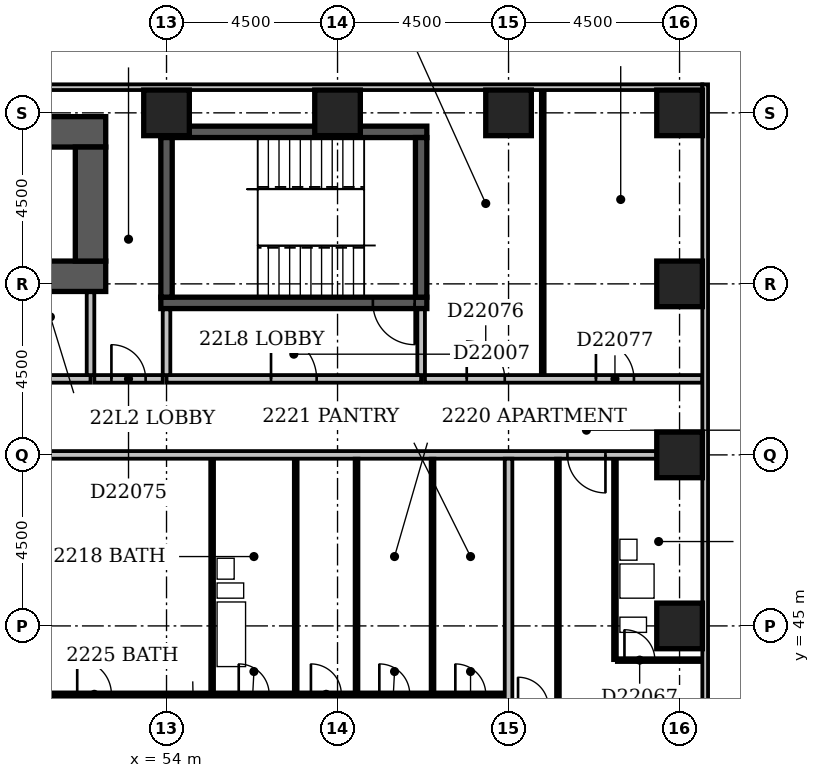
"""IFC4 building model, lengths in metres.
Left out: names, types, materials, properties, quantities, classifications, styles, units other than length and angle.
Written with IfcOpenShell. Run it as: python <this file> out.ifc"""

import sys

from ifc_helpers import new_model, si_unit, direction, frame, frame_2d, origin, origin_2d, place, context, subcontext, project, spatial, rectangle, extrude, element, fill, save


model = new_model("IFC4")
c1 = context("Model", 3, precision=1e-05, world=origin(), true_north=direction((0.0, 1.0)))
c2 = subcontext(c1, "Body", "Model", "MODEL_VIEW")
j1 = project(units=[si_unit("LENGTHUNIT", "METRE"), si_unit("PLANEANGLEUNIT", "RADIAN")], contexts=[c1])
p1 = place(None, origin())
s1 = spatial("IfcSite", under=j1, at=p1, CompositionType="ELEMENT")
p2 = place(p1, origin())
s2 = spatial("IfcBuilding", under=s1, at=p2, CompositionType="ELEMENT")
p3 = place(p2, frame((0.0, 0.0, 90.2)))
s3 = spatial("IfcBuildingStorey", under=s2, at=p3, CompositionType="ELEMENT", Elevation=90.2)
for number, where, z_axis, x_axis in (
    (1, (47.0, 54.2, -0.3), (0.0, 0.0, 1.0), (1.0, 0.0, 0.0)),
    (2, (47.0, 58.0, -0.3), (0.0, 0.0, 1.0), (1.0, 0.0, 0.0)),
):
    element("IfcWall", number, at=place(p3, frame(where, z_axis=z_axis, x_axis=x_axis)), inside=s3, PredefinedType="SHEAR", context=c2, shape_type="SweptSolid", body=[
        extrude(rectangle(XDim=5.4, YDim=0.8, at=frame_2d((2.7, 0.0))), origin(), (0.0, 0.0, 1.0), 3.6),
    ])
p4 = place(p3, frame((52.0, 54.6, -0.3), z_axis=(0.0, 0.0, 1.0), x_axis=(0.0, 1.0, 0.0)))
e3 = element("IfcWall", 3, at=p4, inside=s3, PredefinedType="SHEAR", context=c2, shape_type="SweptSolid", body=[
    extrude(rectangle(XDim=3.0, YDim=0.8, at=frame_2d((1.5, 0.0))), origin(), (0.0, 0.0, 1.0), 3.6),
])
p5 = place(p3, frame((53.85, 53.5, -0.3), z_axis=(0.0, 0.0, 1.0), x_axis=(1.0, 0.0, 0.0)))
e4 = element("IfcWall", 4, at=p5, inside=s3, PredefinedType="SHEAR", context=c2, shape_type="SweptSolid", body=[
    extrude(rectangle(XDim=7.0, YDim=0.3, at=frame_2d((3.5, 0.0))), origin(), (0.0, 0.0, 1.0), 3.6),
])
p6 = place(p5, frame((5.58, 0.0, 0.3)))
e5 = element("IfcOpeningElement", 5, at=p6, cuts=e4, PredefinedType="OPENING", context=c2, shape_type="SweptSolid", body=[
    extrude(rectangle(XDim=1.1, YDim=2.1, at=frame_2d((0.55, 1.05))), frame((0.0, 0.162, 0.0), z_axis=(0.0, -1.0, 0.0), x_axis=(1.0, 0.0, 0.0)), (0.0, 0.0, 1.0), 0.324),
])
p7 = place(p3, frame((53.85, 58.0, -0.3), z_axis=(0.0, 0.0, 1.0), x_axis=(1.0, 0.0, 0.0)))
e6 = element("IfcWall", 6, at=p7, inside=s3, PredefinedType="SHEAR", context=c2, shape_type="SweptSolid", body=[
    extrude(rectangle(XDim=7.0, YDim=0.3, at=frame_2d((3.5, 0.0))), origin(), (0.0, 0.0, 1.0), 3.6),
])
for number, where, z_axis, x_axis in (
    (7, (54.0, 53.65, -0.3), (0.0, 0.0, 1.0), (0.0, 1.0, 0.0)),
    (8, (60.7, 53.65, -0.3), (0.0, 0.0, 1.0), (0.0, 1.0, 0.0)),
):
    element("IfcWall", number, at=place(p3, frame(where, z_axis=z_axis, x_axis=x_axis)), inside=s3, PredefinedType="SHEAR", context=c2, shape_type="SweptSolid", body=[
        extrude(rectangle(XDim=4.2, YDim=0.3, at=frame_2d((2.1, 0.0))), origin(), (0.0, 0.0, 1.0), 3.6),
    ])
for number, where, z_axis, x_axis in (
    (9, (67.5, 45.0, -0.3), (0.0, 0.0, 1.0), (1.0, 0.0, 0.0)),
    (10, (67.5, 49.5, -0.3), (0.0, 0.0, 1.0), (1.0, 0.0, 0.0)),
    (11, (67.5, 54.0, -0.3), (0.0, 0.0, 1.0), (1.0, 0.0, 0.0)),
    (12, (54.0, 58.5, -0.3), (0.0, 0.0, 1.0), (1.0, 0.0, 0.0)),
    (13, (58.5, 58.5, -0.3), (0.0, 0.0, 1.0), (1.0, 0.0, 0.0)),
    (14, (63.0, 58.5, -0.3), (0.0, 0.0, 1.0), (1.0, 0.0, 0.0)),
    (15, (67.5, 58.5, -0.3), (0.0, 0.0, 1.0), (1.0, 0.0, 0.0)),
):
    element("IfcColumn", number, at=place(p3, frame(where, z_axis=z_axis, x_axis=x_axis)), inside=s3, PredefinedType="COLUMN", context=c2, shape_type="SweptSolid", body=[
        extrude(rectangle(XDim=1.2, YDim=1.2, at=origin_2d()), origin(), (0.0, 0.0, 1.0), 3.6),
    ])
p8 = place(p3, frame((68.175, 35.4, 0.0), z_axis=(0.0, 0.0, 1.0), x_axis=(0.0, 1.0, 0.0)))
e16 = element("IfcWall", 16, at=p8, inside=s3, PredefinedType="STANDARD", context=c2, shape_type="SweptSolid", body=[
    extrude(rectangle(XDim=23.85, YDim=0.15, at=frame_2d((11.925, 0.0))), origin(), (0.0, 0.0, 1.0), 2.7),
])
p9 = place(p8, frame((2.49, 0.0, 0.6)))
e17 = element("IfcOpeningElement", 17, at=p9, cuts=e16, PredefinedType="OPENING", context=c2, shape_type="SweptSolid", body=[
    extrude(rectangle(XDim=1.8, YDim=1.8, at=frame_2d((0.9, 0.9))), frame((0.0, 0.087, 0.0), z_axis=(0.0, -1.0, 0.0), x_axis=(1.0, 0.0, 0.0)), (0.0, 0.0, 1.0), 0.174),
])
p10 = place(p3, frame((68.1, 59.175, 0.0), z_axis=(0.0, 0.0, 1.0), x_axis=(-1.0, 0.0, 0.0)))
e18 = element("IfcWall", 18, at=p10, inside=s3, PredefinedType="STANDARD", context=c2, shape_type="SweptSolid", body=[
    extrude(rectangle(XDim=68.85, YDim=0.15, at=frame_2d((34.425, 0.0))), origin(), (0.0, 0.0, 1.0), 2.7),
])
p11 = place(p10, frame((37.65, 0.0, 0.6)))
e19 = element("IfcOpeningElement", 19, at=p11, cuts=e18, PredefinedType="OPENING", context=c2, shape_type="SweptSolid", body=[
    extrude(rectangle(XDim=2.4, YDim=1.8, at=frame_2d((1.2, 0.9))), frame((0.0, 0.087, 0.0), z_axis=(0.0, -1.0, 0.0), x_axis=(1.0, 0.0, 0.0)), (0.0, 0.0, 1.0), 0.174),
])
p12 = place(p3, frame((47.0, 51.5, 0.0), z_axis=(0.0, 0.0, 1.0), x_axis=(1.0, 0.0, 0.0)))
e20 = element("IfcWall", 20, at=p12, inside=s3, PredefinedType="PARTITIONING", context=c2, shape_type="SweptSolid", body=[
    extrude(rectangle(XDim=5.0, YDim=0.2, at=frame_2d((2.5, 0.0))), origin(), (0.0, 0.0, 1.0), 3.3),
])
p13 = place(p12, frame((1.9, 0.0, 0.0)))
e21 = element("IfcOpeningElement", 21, at=p13, cuts=e20, PredefinedType="OPENING", context=c2, shape_type="SweptSolid", body=[
    extrude(rectangle(XDim=1.2, YDim=2.1, at=frame_2d((0.6, 1.05))), frame((0.0, 0.112, 0.0), z_axis=(0.0, -1.0, 0.0), x_axis=(1.0, 0.0, 0.0)), (0.0, 0.0, 1.0), 0.224),
])
p14 = place(p3, frame((52.0, 51.6, 0.0), z_axis=(0.0, 0.0, 1.0), x_axis=(0.0, 1.0, 0.0)))
e22 = element("IfcWall", 22, at=p14, inside=s3, PredefinedType="PARTITIONING", context=c2, shape_type="SweptSolid", body=[
    extrude(rectangle(XDim=2.18, YDim=0.2, at=frame_2d((1.09, 0.0))), origin(), (0.0, 0.0, 1.0), 3.3),
])
p15 = place(p3, frame((54.0, 51.5, 0.0), z_axis=(0.0, 0.0, 1.0), x_axis=(1.0, 0.0, 0.0)))
e23 = element("IfcWall", 23, at=p15, inside=s3, PredefinedType="PARTITIONING", context=c2, shape_type="SweptSolid", body=[
    extrude(rectangle(XDim=6.7, YDim=0.2, at=frame_2d((3.35, 0.0))), origin(), (0.0, 0.0, 1.0), 3.3),
])
p16 = place(p15, frame((2.75, 0.0, 0.0)))
e24 = element("IfcOpeningElement", 24, at=p16, cuts=e23, PredefinedType="OPENING", context=c2, shape_type="SweptSolid", body=[
    extrude(rectangle(XDim=1.2, YDim=2.1, at=frame_2d((0.6, 1.05))), frame((0.0, 0.112, 0.0), z_axis=(0.0, -1.0, 0.0), x_axis=(1.0, 0.0, 0.0)), (0.0, 0.0, 1.0), 0.224),
])
p17 = place(p3, frame((60.7, 51.6, 0.0), z_axis=(0.0, 0.0, 1.0), x_axis=(0.0, 1.0, 0.0)))
e25 = element("IfcWall", 25, at=p17, inside=s3, PredefinedType="PARTITIONING", context=c2, shape_type="SweptSolid", body=[
    extrude(rectangle(XDim=1.73, YDim=0.2, at=frame_2d((0.865, 0.0))), origin(), (0.0, 0.0, 1.0), 3.3),
])
p18 = place(p3, frame((54.0, 51.6, 0.0), z_axis=(0.0, 0.0, 1.0), x_axis=(0.0, 1.0, 0.0)))
e26 = element("IfcWall", 26, at=p18, inside=s3, PredefinedType="PARTITIONING", context=c2, shape_type="SweptSolid", body=[
    extrude(rectangle(XDim=1.73, YDim=0.2, at=frame_2d((0.865, 0.0))), origin(), (0.0, 0.0, 1.0), 2.6),
])
p19 = place(p3, frame((63.0, 36.6, 0.0), z_axis=(0.0, 0.0, 1.0), x_axis=(0.0, 1.0, 0.0)))
e27 = element("IfcWall", 27, at=p19, inside=s3, PredefinedType="PARTITIONING", context=c2, shape_type="SweptSolid", body=[
    extrude(rectangle(XDim=12.8, YDim=0.2, at=frame_2d((6.4, 0.0))), origin(), (0.0, 0.0, 1.0), 2.4),
])
p20 = place(p3, frame((64.3, 42.85, 0.0), z_axis=(0.0, 0.0, 1.0), x_axis=(0.0, 1.0, 0.0)))
e28 = element("IfcWall", 28, at=p20, inside=s3, PredefinedType="PARTITIONING", context=c2, shape_type="SweptSolid", body=[
    extrude(rectangle(XDim=6.55, YDim=0.1, at=frame_2d((3.275, 0.0))), origin(), (0.0, 0.0, 1.0), 3.3),
])
p21 = place(p3, frame((49.05, 43.2, 0.0), z_axis=(0.0, 0.0, 1.0), x_axis=(1.0, 0.0, 0.0)))
e29 = element("IfcWall", 29, at=p21, inside=s3, PredefinedType="PARTITIONING", context=c2, shape_type="SweptSolid", body=[
    extrude(rectangle(XDim=13.85, YDim=0.1, at=frame_2d((6.925, 0.0))), origin(), (0.0, 0.0, 1.0), 3.3),
])
p22 = place(p21, frame((6.85, 0.0, 0.0)))
e30 = element("IfcOpeningElement", 30, at=p22, cuts=e29, PredefinedType="OPENING", context=c2, shape_type="SweptSolid", body=[
    extrude(rectangle(XDim=0.8, YDim=2.1, at=frame_2d((0.4, 1.05))), frame((0.0, 0.062, 0.0), z_axis=(0.0, -1.0, 0.0), x_axis=(1.0, 0.0, 0.0)), (0.0, 0.0, 1.0), 0.124),
])
p23 = place(p21, frame((2.6, 0.0, 0.0)))
e31 = element("IfcOpeningElement", 31, at=p23, cuts=e29, PredefinedType="OPENING", context=c2, shape_type="SweptSolid", body=[
    extrude(rectangle(XDim=0.9, YDim=2.1, at=frame_2d((0.45, 1.05))), frame((0.0, 0.062, 0.0), z_axis=(0.0, -1.0, 0.0), x_axis=(1.0, 0.0, 0.0)), (0.0, 0.0, 1.0), 0.124),
])
p24 = place(p21, frame((12.55, 0.0, 0.0)))
e32 = element("IfcOpeningElement", 32, at=p24, cuts=e29, PredefinedType="OPENING", context=c2, shape_type="SweptSolid", body=[
    extrude(rectangle(XDim=0.8, YDim=2.1, at=frame_2d((0.4, 1.05))), frame((0.0, 0.062, 0.0), z_axis=(0.0, -1.0, 0.0), x_axis=(1.0, 0.0, 0.0)), (0.0, 0.0, 1.0), 0.124),
])
p25 = place(p21, frame((8.75, 0.0, 0.0)))
e33 = element("IfcOpeningElement", 33, at=p25, cuts=e29, PredefinedType="OPENING", context=c2, shape_type="SweptSolid", body=[
    extrude(rectangle(XDim=0.8, YDim=2.1, at=frame_2d((0.4, 1.05))), frame((0.0, 0.062, 0.0), z_axis=(0.0, -1.0, 0.0), x_axis=(1.0, 0.0, 0.0)), (0.0, 0.0, 1.0), 0.124),
])
p26 = place(p21, frame((10.55, 0.0, 0.0)))
e34 = element("IfcOpeningElement", 34, at=p26, cuts=e29, PredefinedType="OPENING", context=c2, shape_type="SweptSolid", body=[
    extrude(rectangle(XDim=0.8, YDim=2.1, at=frame_2d((0.4, 1.05))), frame((0.0, 0.062, 0.0), z_axis=(0.0, -1.0, 0.0), x_axis=(1.0, 0.0, 0.0)), (0.0, 0.0, 1.0), 0.124),
])
for number, where, z_axis, x_axis in (
    (35, (55.2, 43.25, 0.0), (0.0, 0.0, 1.0), (0.0, 1.0, 0.0)),
    (36, (57.4, 43.25, 0.0), (0.0, 0.0, 1.0), (0.0, 1.0, 0.0)),
):
    element("IfcWall", number, at=place(p3, frame(where, z_axis=z_axis, x_axis=x_axis)), inside=s3, PredefinedType="PLUMBINGWALL", context=c2, shape_type="SweptSolid", body=[
        extrude(rectangle(XDim=6.15, YDim=0.1, at=frame_2d((3.075, 0.0))), origin(), (0.0, 0.0, 1.0), 3.3),
    ])
for number, where, z_axis, x_axis in (
    (37, (59.0, 43.25, 0.0), (0.0, 0.0, 1.0), (0.0, 1.0, 0.0)),
    (38, (61.0, 43.25, 0.0), (0.0, 0.0, 1.0), (0.0, 1.0, 0.0)),
):
    element("IfcWall", number, at=place(p3, frame(where, z_axis=z_axis, x_axis=x_axis)), inside=s3, PredefinedType="PARTITIONING", context=c2, shape_type="SweptSolid", body=[
        extrude(rectangle(XDim=6.15, YDim=0.1, at=frame_2d((3.075, 0.0))), origin(), (0.0, 0.0, 1.0), 3.3),
    ])
p27 = place(p3, frame((65.8, 44.1, 0.0), z_axis=(0.0, 0.0, 1.0), x_axis=(0.0, 1.0, 0.0)))
e39 = element("IfcWall", 39, at=p27, inside=s3, PredefinedType="PLUMBINGWALL", context=c2, shape_type="SweptSolid", body=[
    extrude(rectangle(XDim=5.3, YDim=0.1, at=frame_2d((2.65, 0.0))), origin(), (0.0, 0.0, 1.0), 3.3),
])
p28 = place(p3, frame((65.85, 44.1, 0.0), z_axis=(0.0, 0.0, 1.0), x_axis=(1.0, 0.0, 0.0)))
e40 = element("IfcWall", 40, at=p28, inside=s3, PredefinedType="PARTITIONING", context=c2, shape_type="SweptSolid", body=[
    extrude(rectangle(XDim=2.25, YDim=0.1, at=frame_2d((1.125, 0.0))), origin(), (0.0, 0.0, 1.0), 3.3),
])
p29 = place(p28, frame((0.2, 0.0, 0.0)))
e41 = element("IfcOpeningElement", 41, at=p29, cuts=e40, PredefinedType="OPENING", context=c2, shape_type="SweptSolid", body=[
    extrude(rectangle(XDim=0.8, YDim=2.1, at=frame_2d((0.4, 1.05))), frame((0.0, 0.062, 0.0), z_axis=(0.0, -1.0, 0.0), x_axis=(1.0, 0.0, 0.0)), (0.0, 0.0, 1.0), 0.124),
])
p30 = place(p3, frame((9.1, 49.5, 0.0), z_axis=(0.0, 0.0, 1.0), x_axis=(1.0, 0.0, 0.0)))
e42 = element("IfcWall", 42, at=p30, inside=s3, PredefinedType="PARTITIONING", context=c2, shape_type="SweptSolid", body=[
    extrude(rectangle(XDim=57.8, YDim=0.2, at=frame_2d((28.9, 0.0))), origin(), (0.0, 0.0, 1.0), 3.3),
])
p31 = place(p30, frame((13.7, 0.0, 0.0)))
e43 = element("IfcOpeningElement", 43, at=p31, cuts=e42, PredefinedType="OPENING", context=c2, shape_type="SweptSolid", body=[
    extrude(rectangle(XDim=1.0, YDim=2.1, at=frame_2d((0.5, 1.05))), frame((0.0, 0.112, 0.0), z_axis=(0.0, -1.0, 0.0), x_axis=(1.0, 0.0, 0.0)), (0.0, 0.0, 1.0), 0.224),
])
p32 = place(p30, frame((22.7, 0.0, 0.0)))
e44 = element("IfcOpeningElement", 44, at=p32, cuts=e42, PredefinedType="OPENING", context=c2, shape_type="SweptSolid", body=[
    extrude(rectangle(XDim=1.0, YDim=2.1, at=frame_2d((0.5, 1.05))), frame((0.0, 0.112, 0.0), z_axis=(0.0, -1.0, 0.0), x_axis=(1.0, 0.0, 0.0)), (0.0, 0.0, 1.0), 0.224),
])
p33 = place(p30, frame((38.6, 0.0, 0.0)))
e45 = element("IfcOpeningElement", 45, at=p33, cuts=e42, PredefinedType="OPENING", context=c2, shape_type="SweptSolid", body=[
    extrude(rectangle(XDim=1.0, YDim=2.1, at=frame_2d((0.5, 1.05))), frame((0.0, 0.112, 0.0), z_axis=(0.0, -1.0, 0.0), x_axis=(1.0, 0.0, 0.0)), (0.0, 0.0, 1.0), 0.224),
])
p34 = place(p30, frame((55.45, 0.0, 0.0)))
e46 = element("IfcOpeningElement", 46, at=p34, cuts=e42, PredefinedType="OPENING", context=c2, shape_type="SweptSolid", body=[
    extrude(rectangle(XDim=1.0, YDim=2.1, at=frame_2d((0.5, 1.05))), frame((0.0, 0.112, 0.0), z_axis=(0.0, -1.0, 0.0), x_axis=(1.0, 0.0, 0.0)), (0.0, 0.0, 1.0), 0.224),
])
p35 = place(p30, frame((6.15, 0.0, 0.0)))
e47 = element("IfcOpeningElement", 47, at=p35, cuts=e42, PredefinedType="OPENING", context=c2, shape_type="SweptSolid", body=[
    extrude(rectangle(XDim=0.9, YDim=2.1, at=frame_2d((0.45, 1.05))), frame((0.0, 0.112, 0.0), z_axis=(0.0, -1.0, 0.0), x_axis=(1.0, 0.0, 0.0)), (0.0, 0.0, 1.0), 0.224),
])
p36 = place(p3, frame((52.1, 51.5, 0.0), z_axis=(0.0, 0.0, 1.0), x_axis=(1.0, 0.0, 0.0)))
e48 = element("IfcWall", 48, at=p36, inside=s3, PredefinedType="PARTITIONING", context=c2, shape_type="SweptSolid", body=[
    extrude(rectangle(XDim=1.8, YDim=0.2, at=frame_2d((0.9, 0.0))), origin(), (0.0, 0.0, 1.0), 3.3),
])
p37 = place(p36, frame((0.45, 0.0, 0.0)))
e49 = element("IfcOpeningElement", 49, at=p37, cuts=e48, PredefinedType="OPENING", context=c2, shape_type="SweptSolid", body=[
    extrude(rectangle(XDim=0.9, YDim=2.1, at=frame_2d((0.45, 1.05))), frame((0.0, 0.112, 0.0), z_axis=(0.0, -1.0, 0.0), x_axis=(1.0, 0.0, 0.0)), (0.0, 0.0, 1.0), 0.224),
])
p38 = place(p3, frame((60.8, 51.5, 0.0), z_axis=(0.0, 0.0, 1.0), x_axis=(1.0, 0.0, 0.0)))
e50 = element("IfcWall", 50, at=p38, inside=s3, PredefinedType="PARTITIONING", context=c2, shape_type="SweptSolid", body=[
    extrude(rectangle(XDim=7.3, YDim=0.2, at=frame_2d((3.65, 0.0))), origin(), (0.0, 0.0, 1.0), 3.3),
])
p39 = place(p38, frame((1.1, 0.0, 0.0)))
e51 = element("IfcOpeningElement", 51, at=p39, cuts=e50, PredefinedType="OPENING", context=c2, shape_type="SweptSolid", body=[
    extrude(rectangle(XDim=1.0, YDim=2.1, at=frame_2d((0.5, 1.05))), frame((0.0, 0.112, 0.0), z_axis=(0.0, -1.0, 0.0), x_axis=(1.0, 0.0, 0.0)), (0.0, 0.0, 1.0), 0.224),
])
p40 = place(p38, frame((4.5, 0.0, 0.0)))
e52 = element("IfcOpeningElement", 52, at=p40, cuts=e50, PredefinedType="OPENING", context=c2, shape_type="SweptSolid", body=[
    extrude(rectangle(XDim=1.0, YDim=2.1, at=frame_2d((0.5, 1.05))), frame((0.0, 0.112, 0.0), z_axis=(0.0, -1.0, 0.0), x_axis=(1.0, 0.0, 0.0)), (0.0, 0.0, 1.0), 0.224),
])
p41 = place(p3, frame((63.9, 51.6, 0.0), z_axis=(0.0, 0.0, 1.0), x_axis=(0.0, 1.0, 0.0)))
e53 = element("IfcWall", 53, at=p41, inside=s3, PredefinedType="PARTITIONING", context=c2, shape_type="SweptSolid", body=[
    extrude(rectangle(XDim=7.5, YDim=0.1, at=frame_2d((3.75, 0.0))), origin(), (0.0, 0.0, 1.0), 3.3),
])
p42 = place(p16, origin())
e54 = element("IfcDoor", 54, at=p42, inside=s3, OperationType="SINGLE_SWING_LEFT", PredefinedType="DOOR", context=c2, shape_type="SweptSolid", body=[
    extrude(rectangle(XDim=1.2, YDim=2.1, at=frame_2d((0.6, 1.05))), frame((0.0, 0.025, 0.0), z_axis=(0.0, -1.0, 0.0), x_axis=(1.0, 0.0, 0.0)), (0.0, 0.0, 1.0), 0.05),
])
fill(e24, e54)
p43 = place(p6, origin())
e55 = element("IfcDoor", 55, at=p43, inside=s3, OperationType="SINGLE_SWING_RIGHT", PredefinedType="DOOR", context=c2, shape_type="SweptSolid", body=[
    extrude(rectangle(XDim=1.1, YDim=2.1, at=frame_2d((0.55, 1.05))), frame((0.0, 0.025, 0.0), z_axis=(0.0, -1.0, 0.0), x_axis=(1.0, 0.0, 0.0)), (0.0, 0.0, 1.0), 0.05),
])
fill(e5, e55)
p44 = place(p22, origin())
e56 = element("IfcDoor", 56, at=p44, inside=s3, OperationType="SINGLE_SWING_LEFT", PredefinedType="DOOR", context=c2, shape_type="SweptSolid", body=[
    extrude(rectangle(XDim=0.8, YDim=2.1, at=frame_2d((0.4, 1.05))), frame((0.0, 0.025, 0.0), z_axis=(0.0, -1.0, 0.0), x_axis=(1.0, 0.0, 0.0)), (0.0, 0.0, 1.0), 0.05),
])
fill(e30, e56)
p45 = place(p23, origin())
e57 = element("IfcDoor", 57, at=p45, inside=s3, OperationType="SINGLE_SWING_LEFT", PredefinedType="DOOR", context=c2, shape_type="SweptSolid", body=[
    extrude(rectangle(XDim=0.9, YDim=2.1, at=frame_2d((0.45, 1.05))), frame((0.0, 0.025, 0.0), z_axis=(0.0, -1.0, 0.0), x_axis=(1.0, 0.0, 0.0)), (0.0, 0.0, 1.0), 0.05),
])
fill(e31, e57)
p46 = place(p24, origin())
e58 = element("IfcDoor", 58, at=p46, inside=s3, OperationType="SINGLE_SWING_LEFT", PredefinedType="DOOR", context=c2, shape_type="SweptSolid", body=[
    extrude(rectangle(XDim=0.8, YDim=2.1, at=frame_2d((0.4, 1.05))), frame((0.0, 0.025, 0.0), z_axis=(0.0, -1.0, 0.0), x_axis=(1.0, 0.0, 0.0)), (0.0, 0.0, 1.0), 0.05),
])
fill(e32, e58)
p47 = place(p25, origin())
e59 = element("IfcDoor", 59, at=p47, inside=s3, OperationType="SINGLE_SWING_LEFT", PredefinedType="DOOR", context=c2, shape_type="SweptSolid", body=[
    extrude(rectangle(XDim=0.8, YDim=2.1, at=frame_2d((0.4, 1.05))), frame((0.0, 0.025, 0.0), z_axis=(0.0, -1.0, 0.0), x_axis=(1.0, 0.0, 0.0)), (0.0, 0.0, 1.0), 0.05),
])
fill(e33, e59)
p48 = place(p26, origin())
e60 = element("IfcDoor", 60, at=p48, inside=s3, OperationType="SINGLE_SWING_LEFT", PredefinedType="DOOR", context=c2, shape_type="SweptSolid", body=[
    extrude(rectangle(XDim=0.8, YDim=2.1, at=frame_2d((0.4, 1.05))), frame((0.0, 0.025, 0.0), z_axis=(0.0, -1.0, 0.0), x_axis=(1.0, 0.0, 0.0)), (0.0, 0.0, 1.0), 0.05),
])
fill(e34, e60)
p49 = place(p29, origin())
e61 = element("IfcDoor", 61, at=p49, inside=s3, OperationType="SINGLE_SWING_LEFT", PredefinedType="DOOR", context=c2, shape_type="SweptSolid", body=[
    extrude(rectangle(XDim=0.8, YDim=2.1, at=frame_2d((0.4, 1.05))), frame((0.0, 0.025, 0.0), z_axis=(0.0, -1.0, 0.0), x_axis=(1.0, 0.0, 0.0)), (0.0, 0.0, 1.0), 0.05),
])
fill(e41, e61)
p50 = place(p34, origin())
e62 = element("IfcDoor", 62, at=p50, inside=s3, OperationType="SINGLE_SWING_RIGHT", PredefinedType="DOOR", context=c2, shape_type="SweptSolid", body=[
    extrude(rectangle(XDim=1.0, YDim=2.1, at=frame_2d((0.5, 1.05))), frame((0.0, 0.025, 0.0), z_axis=(0.0, -1.0, 0.0), x_axis=(1.0, 0.0, 0.0)), (0.0, 0.0, 1.0), 0.05),
])
fill(e46, e62)
p51 = place(p37, origin())
e63 = element("IfcDoor", 63, at=p51, inside=s3, OperationType="SINGLE_SWING_LEFT", PredefinedType="DOOR", context=c2, shape_type="SweptSolid", body=[
    extrude(rectangle(XDim=0.9, YDim=2.1, at=frame_2d((0.45, 1.05))), frame((0.0, 0.025, 0.0), z_axis=(0.0, -1.0, 0.0), x_axis=(1.0, 0.0, 0.0)), (0.0, 0.0, 1.0), 0.05),
])
fill(e49, e63)
p52 = place(p39, origin())
e64 = element("IfcDoor", 64, at=p52, inside=s3, OperationType="SINGLE_SWING_LEFT", PredefinedType="DOOR", context=c2, shape_type="SweptSolid", body=[
    extrude(rectangle(XDim=1.0, YDim=2.1, at=frame_2d((0.5, 1.05))), frame((0.0, 0.025, 0.0), z_axis=(0.0, -1.0, 0.0), x_axis=(1.0, 0.0, 0.0)), (0.0, 0.0, 1.0), 0.05),
])
fill(e51, e64)
p53 = place(p40, origin())
e65 = element("IfcDoor", 65, at=p53, inside=s3, OperationType="SINGLE_SWING_LEFT", PredefinedType="DOOR", context=c2, shape_type="SweptSolid", body=[
    extrude(rectangle(XDim=1.0, YDim=2.1, at=frame_2d((0.5, 1.05))), frame((0.0, 0.025, 0.0), z_axis=(0.0, -1.0, 0.0), x_axis=(1.0, 0.0, 0.0)), (0.0, 0.0, 1.0), 0.05),
])
fill(e52, e65)
save(model, sys.argv[1])
